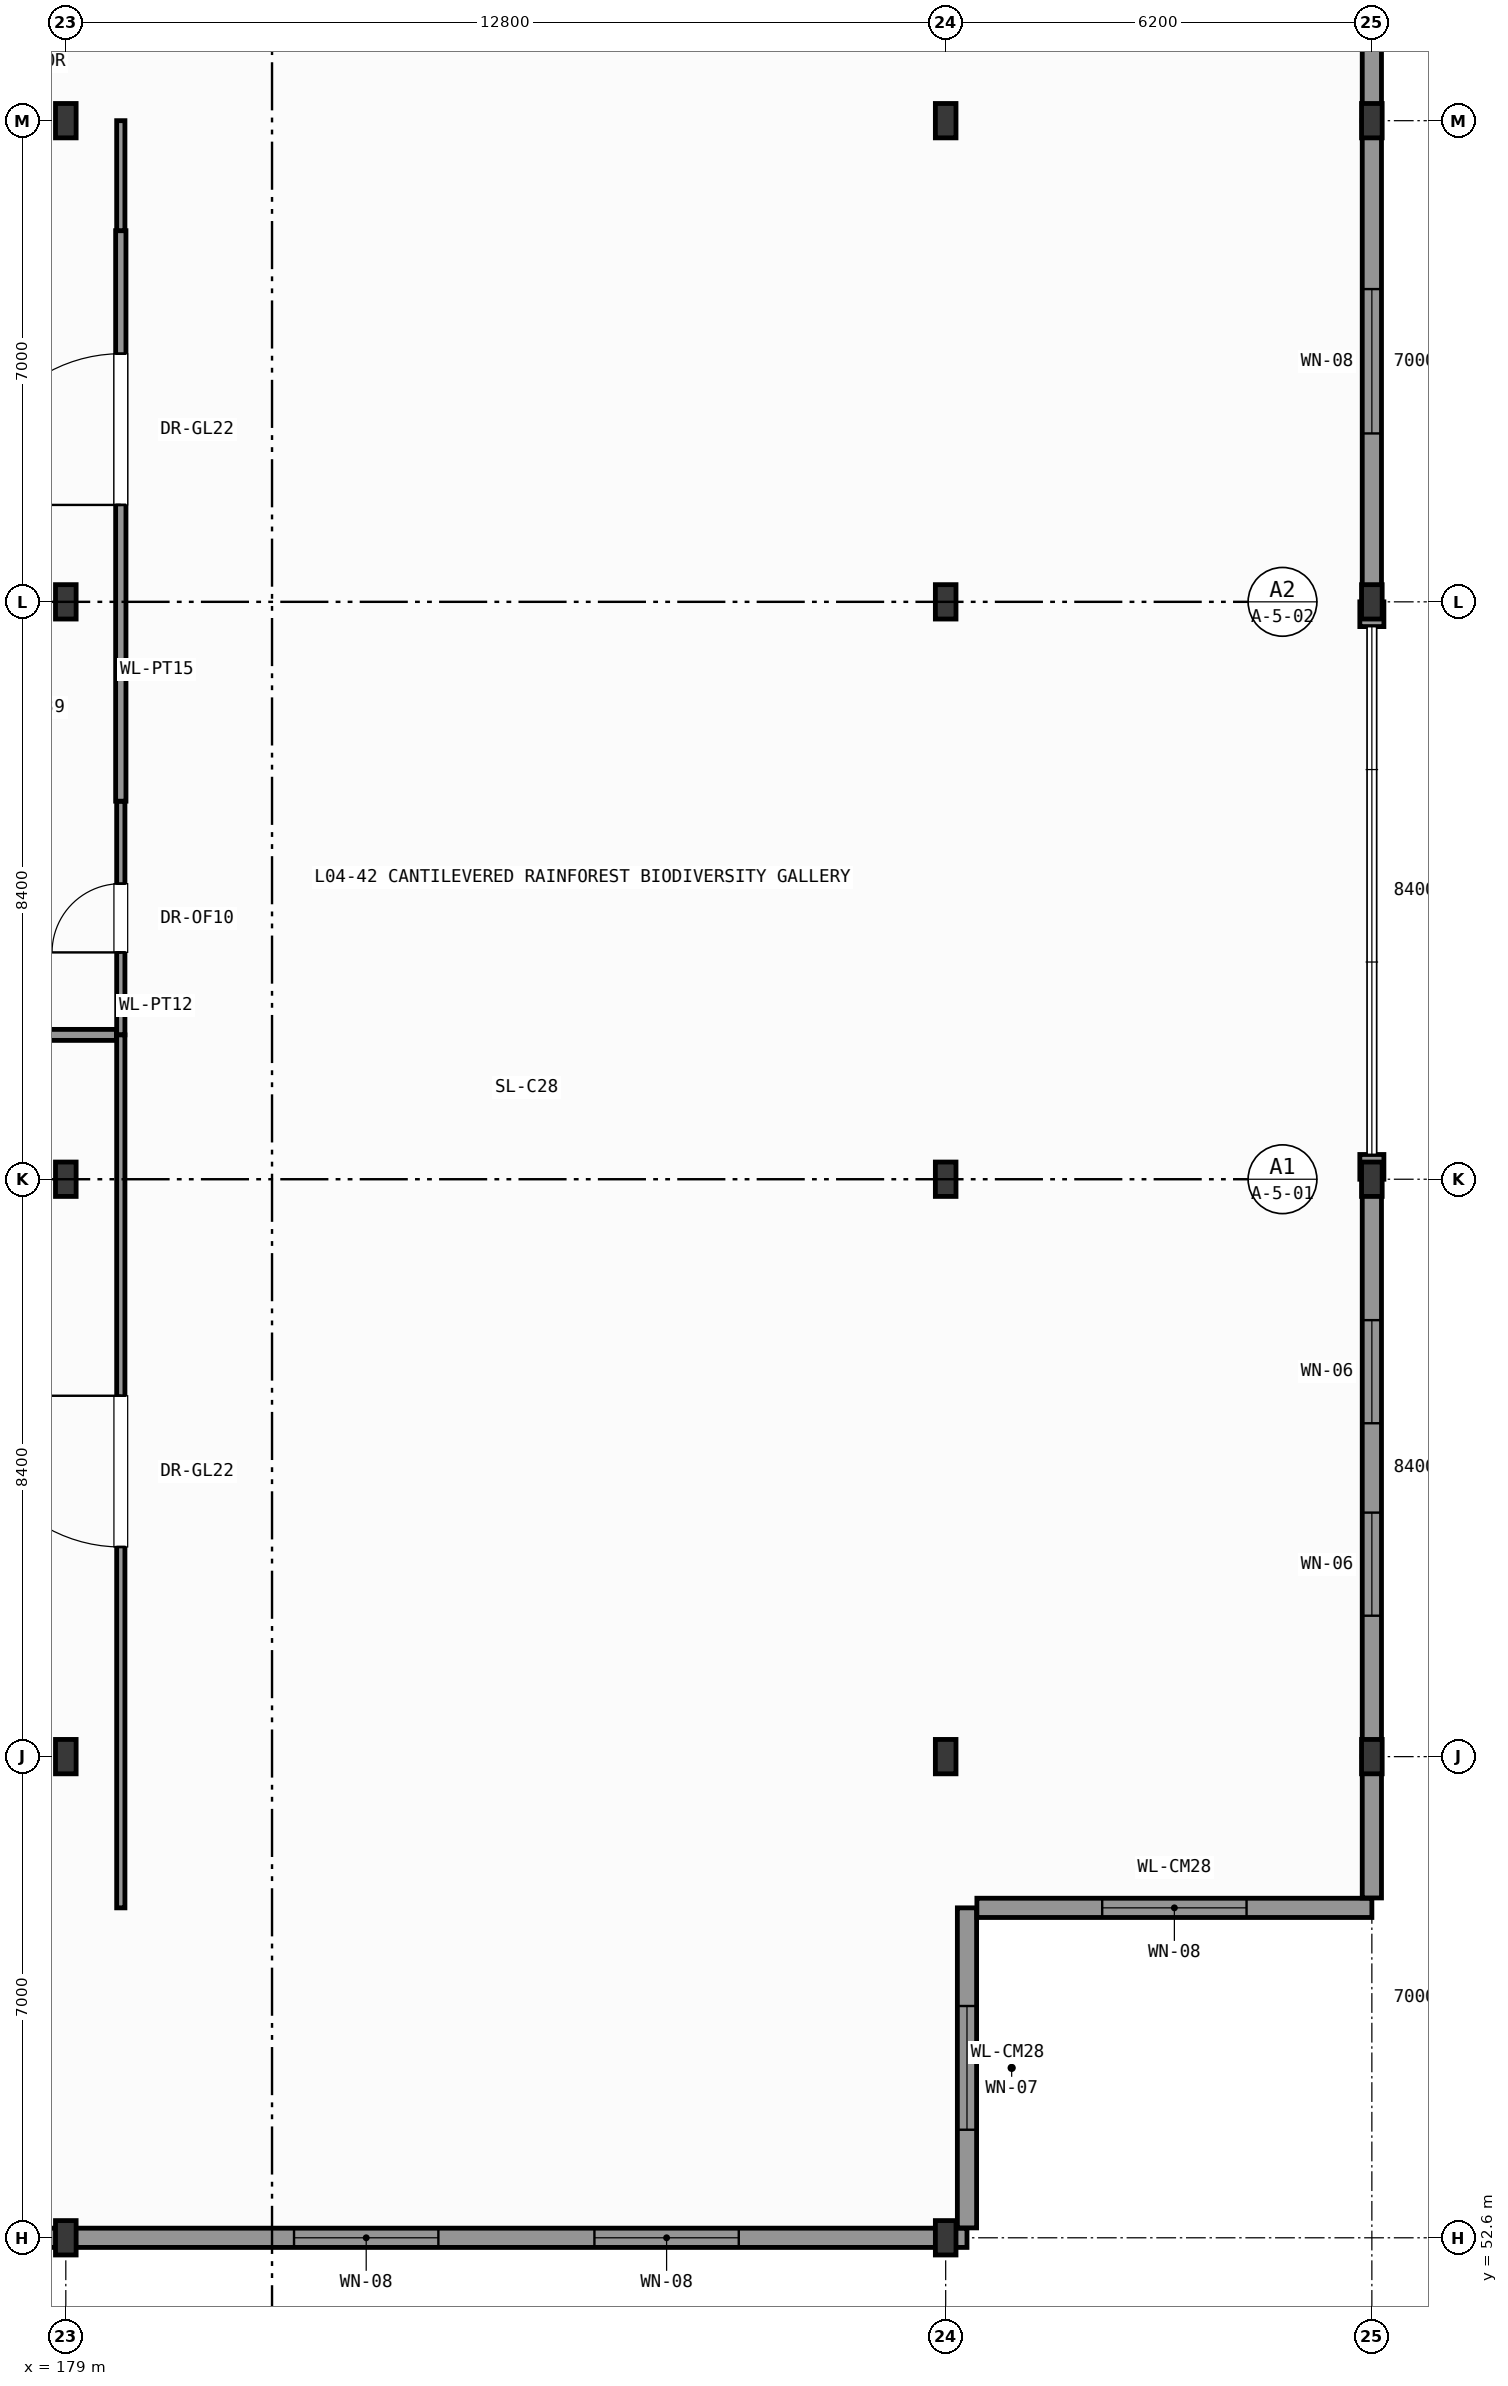
"""IFC4 building model, lengths in metres.
Left out: names, types, materials, properties, quantities, classifications, styles, units other than length and angle.
Written with IfcOpenShell. Run it as: python <this file> out.ifc"""

import sys

from ifc_helpers import new_model, si_unit, direction, frame, frame_2d, origin, origin_2d, place, context, subcontext, project, spatial, rectangle, i_section, extrude, element, fill, save


model = new_model("IFC4")
c1 = context("Model", 3, precision=1e-05, world=origin(), true_north=direction((0.0, 1.0)))
c2 = subcontext(c1, "Body", "Model", "MODEL_VIEW")
j1 = project(units=[si_unit("LENGTHUNIT", "METRE"), si_unit("PLANEANGLEUNIT", "RADIAN")], contexts=[c1])
p1 = place(None, origin())
s1 = spatial("IfcSite", under=j1, at=p1, CompositionType="ELEMENT")
p2 = place(p1, origin())
s2 = spatial("IfcBuilding", under=s1, at=p2, CompositionType="ELEMENT")
p3 = place(p2, frame((0.0, 0.0, 18.0)))
s3 = spatial("IfcBuildingStorey", under=s2, at=p3, CompositionType="ELEMENT", Elevation=18.0)
for number, where, z_axis, x_axis in (
    (1, (179.0, 52.6, 0.0), (0.0, 0.0, 1.0), (1.0, 0.0, 0.0)),
    (2, (179.0, 59.6, 0.0), (0.0, 0.0, 1.0), (1.0, 0.0, 0.0)),
    (3, (179.0, 68.0, 0.0), (0.0, 0.0, 1.0), (1.0, 0.0, 0.0)),
    (4, (179.0, 76.4, 0.0), (0.0, 0.0, 1.0), (1.0, 0.0, 0.0)),
    (5, (179.0, 83.4, 0.0), (0.0, 0.0, 1.0), (1.0, 0.0, 0.0)),
    (6, (191.8, 52.6, 0.0), (0.0, 0.0, 1.0), (1.0, 0.0, 0.0)),
    (7, (191.8, 59.6, 0.0), (0.0, 0.0, 1.0), (1.0, 0.0, 0.0)),
    (8, (191.8, 68.0, 0.0), (0.0, 0.0, 1.0), (1.0, 0.0, 0.0)),
    (9, (191.8, 76.4, 0.0), (0.0, 0.0, 1.0), (1.0, 0.0, 0.0)),
    (10, (191.8, 83.4, 0.0), (0.0, 0.0, 1.0), (1.0, 0.0, 0.0)),
    (11, (198.0, 59.6, 0.0), (0.0, 0.0, 1.0), (1.0, 0.0, 0.0)),
    (12, (198.0, 68.0, 0.0), (0.0, 0.0, 1.0), (1.0, 0.0, 0.0)),
    (13, (198.0, 76.4, 0.0), (0.0, 0.0, 1.0), (1.0, 0.0, 0.0)),
    (14, (198.0, 83.4, 0.0), (0.0, 0.0, 1.0), (1.0, 0.0, 0.0)),
):
    element("IfcColumn", number, at=place(p3, frame(where, z_axis=z_axis, x_axis=x_axis)), inside=s3, PredefinedType="COLUMN", context=c2, shape_type="SweptSolid", body=[
        extrude(i_section(OverallWidth=0.3, OverallDepth=0.5, WebThickness=0.014, FlangeThickness=0.028, FilletRadius=0.027, at=origin_2d()), origin(), (0.0, 0.0, 1.0), 4.2),
    ])
p4 = place(p3, frame((179.0, 52.6, 0.0), z_axis=(0.0, 0.0, 1.0), x_axis=(-1.0, 0.0, 0.0)))
e15 = element("IfcWall", 15, at=p4, inside=s3, PredefinedType="SOLIDWALL", context=c2, shape_type="SweptSolid", body=[
    extrude(rectangle(XDim=11.856, YDim=0.28, at=frame_2d((5.928, 0.0))), origin(), (0.0, 0.0, 1.0), 3.385),
])
p5 = place(p4, frame((3.202, 0.0, 0.95)))
e16 = element("IfcOpeningElement", 16, at=p5, cuts=e15, PredefinedType="OPENING", context=c2, shape_type="SweptSolid", body=[
    extrude(rectangle(XDim=1.5, YDim=2.04, at=frame_2d((0.75, 1.02))), frame((0.0, 0.15, 0.0), z_axis=(0.0, -1.0, 0.0), x_axis=(1.0, 0.0, 0.0)), (0.0, 0.0, 1.0), 0.3),
])
p6 = place(p4, frame((7.154, 0.0, 0.95)))
e17 = element("IfcOpeningElement", 17, at=p6, cuts=e15, PredefinedType="OPENING", context=c2, shape_type="SweptSolid", body=[
    extrude(rectangle(XDim=1.5, YDim=2.04, at=frame_2d((0.75, 1.02))), frame((0.0, 0.15, 0.0), z_axis=(0.0, -1.0, 0.0), x_axis=(1.0, 0.0, 0.0)), (0.0, 0.0, 1.0), 0.3),
])
p7 = place(p3, frame((192.11, 52.6, 0.0), z_axis=(0.0, 0.0, 1.0), x_axis=(-1.0, 0.0, 0.0)))
e18 = element("IfcWall", 18, at=p7, inside=s3, PredefinedType="SOLIDWALL", context=c2, shape_type="SweptSolid", body=[
    extrude(rectangle(XDim=13.11, YDim=0.28, at=frame_2d((6.555, 0.0))), origin(), (0.0, 0.0, 1.0), 3.385),
])
p8 = place(p7, frame((3.32, 0.0, 0.95)))
e19 = element("IfcOpeningElement", 19, at=p8, cuts=e18, PredefinedType="OPENING", context=c2, shape_type="SweptSolid", body=[
    extrude(rectangle(XDim=2.1, YDim=2.04, at=frame_2d((1.05, 1.02))), frame((0.0, 0.15, 0.0), z_axis=(0.0, -1.0, 0.0), x_axis=(1.0, 0.0, 0.0)), (0.0, 0.0, 1.0), 0.3),
])
p9 = place(p7, frame((7.69, 0.0, 0.95)))
e20 = element("IfcOpeningElement", 20, at=p9, cuts=e18, PredefinedType="OPENING", context=c2, shape_type="SweptSolid", body=[
    extrude(rectangle(XDim=2.1, YDim=2.04, at=frame_2d((1.05, 1.02))), frame((0.0, 0.15, 0.0), z_axis=(0.0, -1.0, 0.0), x_axis=(1.0, 0.0, 0.0)), (0.0, 0.0, 1.0), 0.3),
])
p10 = place(p3, frame((192.11, 57.4, 0.0), z_axis=(0.0, 0.0, 1.0), x_axis=(0.0, -1.0, 0.0)))
e21 = element("IfcWall", 21, at=p10, inside=s3, PredefinedType="SOLIDWALL", context=c2, shape_type="SweptSolid", body=[
    extrude(rectangle(XDim=4.656, YDim=0.28, at=frame_2d((2.328, 0.0))), origin(), (0.0, 0.0, 1.0), 3.645),
])
p11 = place(p10, frame((1.428, 0.0, 0.95)))
e22 = element("IfcOpeningElement", 22, at=p11, cuts=e21, PredefinedType="OPENING", context=c2, shape_type="SweptSolid", body=[
    extrude(rectangle(XDim=1.8, YDim=2.29, at=frame_2d((0.9, 1.145))), frame((0.0, 0.15, 0.0), z_axis=(0.0, -1.0, 0.0), x_axis=(1.0, 0.0, 0.0)), (0.0, 0.0, 1.0), 0.3),
])
p12 = place(p3, frame((198.0, 57.4, 0.0), z_axis=(0.0, 0.0, 1.0), x_axis=(-1.0, 0.0, 0.0)))
e23 = element("IfcWall", 23, at=p12, inside=s3, PredefinedType="SOLIDWALL", context=c2, shape_type="SweptSolid", body=[
    extrude(rectangle(XDim=5.746, YDim=0.28, at=frame_2d((2.873, 0.0))), origin(), (0.0, 0.0, 1.0), 3.98),
])
p13 = place(p12, frame((1.823, 0.0, 0.95)))
e24 = element("IfcOpeningElement", 24, at=p13, cuts=e23, PredefinedType="OPENING", context=c2, shape_type="SweptSolid", body=[
    extrude(rectangle(XDim=2.1, YDim=2.63, at=frame_2d((1.05, 1.315))), frame((0.0, 0.15, 0.0), z_axis=(0.0, -1.0, 0.0), x_axis=(1.0, 0.0, 0.0)), (0.0, 0.0, 1.0), 0.3),
])
p14 = place(p3, frame((198.0, 59.6, 0.0), z_axis=(0.0, 0.0, 1.0), x_axis=(0.0, -1.0, 0.0)))
e25 = element("IfcWall", 25, at=p14, inside=s3, PredefinedType="SOLIDWALL", context=c2, shape_type="SweptSolid", body=[
    extrude(rectangle(XDim=2.056, YDim=0.28, at=frame_2d((1.028, 0.0))), origin(), (0.0, 0.0, 1.0), 3.98),
])
p15 = place(p3, frame((198.0, 68.0, 0.0), z_axis=(0.0, 0.0, 1.0), x_axis=(0.0, -1.0, 0.0)))
e26 = element("IfcWall", 26, at=p15, inside=s3, PredefinedType="SOLIDWALL", context=c2, shape_type="SweptSolid", body=[
    extrude(rectangle(XDim=8.4, YDim=0.28, at=frame_2d((4.2, 0.0))), origin(), (0.0, 0.0, 1.0), 3.495),
])
p16 = place(p15, frame((2.05, 0.0, 0.95)))
e27 = element("IfcOpeningElement", 27, at=p16, cuts=e26, PredefinedType="OPENING", context=c2, shape_type="SweptSolid", body=[
    extrude(rectangle(XDim=1.5, YDim=2.15, at=frame_2d((0.75, 1.075))), frame((0.0, 0.15, 0.0), z_axis=(0.0, -1.0, 0.0), x_axis=(1.0, 0.0, 0.0)), (0.0, 0.0, 1.0), 0.3),
])
p17 = place(p15, frame((4.85, 0.0, 0.95)))
e28 = element("IfcOpeningElement", 28, at=p17, cuts=e26, PredefinedType="OPENING", context=c2, shape_type="SweptSolid", body=[
    extrude(rectangle(XDim=1.5, YDim=2.15, at=frame_2d((0.75, 1.075))), frame((0.0, 0.15, 0.0), z_axis=(0.0, -1.0, 0.0), x_axis=(1.0, 0.0, 0.0)), (0.0, 0.0, 1.0), 0.3),
])
p18 = place(p3, frame((198.0, 68.0, 0.0), z_axis=(0.0, 0.0, 1.0), x_axis=(0.0, 1.0, 0.0)))
e29 = element("IfcWall", 29, at=p18, inside=s3, PredefinedType="SOLIDWALL", context=c2, shape_type="SweptSolid", body=[
    extrude(rectangle(XDim=0.36, YDim=0.35, at=frame_2d((0.18, 0.0))), origin(), (0.0, 0.0, 1.0), 3.495),
])
p19 = place(p3, frame((198.0, 76.04, 0.0), z_axis=(0.0, 0.0, 1.0), x_axis=(0.0, 1.0, 0.0)))
e30 = element("IfcWall", 30, at=p19, inside=s3, PredefinedType="SOLIDWALL", context=c2, shape_type="SweptSolid", body=[
    extrude(rectangle(XDim=0.36, YDim=0.35, at=frame_2d((0.18, 0.0))), origin(), (0.0, 0.0, 1.0), 3.495),
])
p20 = place(p3, frame((198.0, 83.4, 0.0), z_axis=(0.0, 0.0, 1.0), x_axis=(0.0, -1.0, 0.0)))
e31 = element("IfcWall", 31, at=p20, inside=s3, PredefinedType="SOLIDWALL", context=c2, shape_type="SweptSolid", body=[
    extrude(rectangle(XDim=7.0, YDim=0.28, at=frame_2d((3.5, 0.0))), origin(), (0.0, 0.0, 1.0), 3.645),
])
p21 = place(p20, frame((2.45, 0.0, 0.95)))
e32 = element("IfcOpeningElement", 32, at=p21, cuts=e31, PredefinedType="OPENING", context=c2, shape_type="SweptSolid", body=[
    extrude(rectangle(XDim=2.1, YDim=2.29, at=frame_2d((1.05, 1.145))), frame((0.0, 0.15, 0.0), z_axis=(0.0, -1.0, 0.0), x_axis=(1.0, 0.0, 0.0)), (0.0, 0.0, 1.0), 0.3),
])
p22 = place(p3, frame((198.0, 90.4, 0.0), z_axis=(0.0, 0.0, 1.0), x_axis=(0.0, -1.0, 0.0)))
e33 = element("IfcWall", 33, at=p22, inside=s3, PredefinedType="SOLIDWALL", context=c2, shape_type="SweptSolid", body=[
    extrude(rectangle(XDim=7.0, YDim=0.28, at=frame_2d((3.5, 0.0))), origin(), (0.0, 0.0, 1.0), 3.645),
])
p23 = place(p22, frame((1.583, 0.0, 0.95)))
e34 = element("IfcOpeningElement", 34, at=p23, cuts=e33, PredefinedType="OPENING", context=c2, shape_type="SweptSolid", body=[
    extrude(rectangle(XDim=1.5, YDim=2.29, at=frame_2d((0.75, 1.145))), frame((0.0, 0.15, 0.0), z_axis=(0.0, -1.0, 0.0), x_axis=(1.0, 0.0, 0.0)), (0.0, 0.0, 1.0), 0.3),
])
p24 = place(p22, frame((3.917, 0.0, 0.95)))
e35 = element("IfcOpeningElement", 35, at=p24, cuts=e33, PredefinedType="OPENING", context=c2, shape_type="SweptSolid", body=[
    extrude(rectangle(XDim=1.5, YDim=2.29, at=frame_2d((0.75, 1.145))), frame((0.0, 0.15, 0.0), z_axis=(0.0, -1.0, 0.0), x_axis=(1.0, 0.0, 0.0)), (0.0, 0.0, 1.0), 0.3),
])
p25 = place(p3, frame((179.8, 70.1, 0.0), z_axis=(0.0, 0.0, 1.0), x_axis=(0.0, 1.0, 0.0)))
e36 = element("IfcWall", 36, at=p25, inside=s3, PredefinedType="PARTITIONING", context=c2, shape_type="SweptSolid", body=[
    extrude(rectangle(XDim=3.4, YDim=0.12, at=frame_2d((1.7, 0.0))), origin(), (0.0, 0.0, 1.0), 3.98),
])
p26 = place(p25, frame((1.2, 0.0, 0.0)))
e37 = element("IfcOpeningElement", 37, at=p26, cuts=e36, PredefinedType="OPENING", context=c2, shape_type="SweptSolid", body=[
    extrude(rectangle(XDim=1.0, YDim=2.15, at=frame_2d((0.5, 1.075))), frame((0.0, 0.07, 0.0), z_axis=(0.0, -1.0, 0.0), x_axis=(1.0, 0.0, 0.0)), (0.0, 0.0, 1.0), 0.14),
])
p27 = place(p3, frame((170.479, 70.1, 0.0), z_axis=(0.0, 0.0, 1.0), x_axis=(1.0, 0.0, 0.0)))
e38 = element("IfcWall", 38, at=p27, inside=s3, PredefinedType="PARTITIONING", context=c2, shape_type="SweptSolid", body=[
    extrude(rectangle(XDim=9.257, YDim=0.16, at=frame_2d((4.628, 0.0))), origin(), (0.0, 0.0, 1.0), 3.98),
])
p28 = place(p27, frame((3.529, 0.0, 0.0)))
e39 = element("IfcOpeningElement", 39, at=p28, cuts=e38, PredefinedType="OPENING", context=c2, shape_type="SweptSolid", body=[
    extrude(rectangle(XDim=2.2, YDim=2.6, at=frame_2d((1.1, 1.3))), frame((0.0, 0.09, 0.0), z_axis=(0.0, -1.0, 0.0), x_axis=(1.0, 0.0, 0.0)), (0.0, 0.0, 1.0), 0.18),
])
p29 = place(p3, frame((179.8, 73.5, 0.0), z_axis=(0.0, 0.0, 1.0), x_axis=(0.0, 1.0, 0.0)))
e40 = element("IfcWall", 40, at=p29, inside=s3, PredefinedType="PARTITIONING", context=c2, shape_type="SweptSolid", body=[
    extrude(rectangle(XDim=8.3, YDim=0.15, at=frame_2d((4.15, 0.0))), origin(), (0.0, 0.0, 1.0), 3.98),
])
p30 = place(p29, frame((4.31, 0.0, 0.0)))
e41 = element("IfcOpeningElement", 41, at=p30, cuts=e40, PredefinedType="OPENING", context=c2, shape_type="SweptSolid", body=[
    extrude(rectangle(XDim=2.2, YDim=2.6, at=frame_2d((1.1, 1.3))), frame((0.0, 0.085, 0.0), z_axis=(0.0, -1.0, 0.0), x_axis=(1.0, 0.0, 0.0)), (0.0, 0.0, 1.0), 0.17),
])
p31 = place(p3, frame((179.8, 81.8, 0.0), z_axis=(0.0, 0.0, 1.0), x_axis=(0.0, 1.0, 0.0)))
e42 = element("IfcWall", 42, at=p31, inside=s3, PredefinedType="PARTITIONING", context=c2, shape_type="SweptSolid", body=[
    extrude(rectangle(XDim=1.6, YDim=0.12, at=frame_2d((0.8, 0.0))), origin(), (0.0, 0.0, 1.0), 3.98),
])
p32 = place(p3, frame((179.8, 57.4, 0.0), z_axis=(0.0, 0.0, 1.0), x_axis=(0.0, 1.0, 0.0)))
e43 = element("IfcWall", 43, at=p32, inside=s3, PredefinedType="PARTITIONING", context=c2, shape_type="SweptSolid", body=[
    extrude(rectangle(XDim=12.7, YDim=0.12, at=frame_2d((6.35, 0.0))), origin(), (0.0, 0.0, 1.0), 3.98),
])
p33 = place(p32, frame((5.25, 0.0, 0.0)))
e44 = element("IfcOpeningElement", 44, at=p33, cuts=e43, PredefinedType="OPENING", context=c2, shape_type="SweptSolid", body=[
    extrude(rectangle(XDim=2.2, YDim=2.6, at=frame_2d((1.1, 1.3))), frame((0.0, 0.07, 0.0), z_axis=(0.0, -1.0, 0.0), x_axis=(1.0, 0.0, 0.0)), (0.0, 0.0, 1.0), 0.14),
])
p34 = place(p8, origin())
e45 = element("IfcWindow", 45, at=p34, inside=s3, PartitioningType="SINGLE_PANEL", PredefinedType="WINDOW", context=c2, shape_type="SweptSolid", body=[
    extrude(rectangle(XDim=2.1, YDim=2.04, at=frame_2d((1.05, 1.02))), frame((0.0, 0.03, 0.0), z_axis=(0.0, -1.0, 0.0), x_axis=(1.0, 0.0, 0.0)), (0.0, 0.0, 1.0), 0.06),
])
fill(e19, e45)
p35 = place(p9, origin())
e46 = element("IfcWindow", 46, at=p35, inside=s3, PartitioningType="SINGLE_PANEL", PredefinedType="WINDOW", context=c2, shape_type="SweptSolid", body=[
    extrude(rectangle(XDim=2.1, YDim=2.04, at=frame_2d((1.05, 1.02))), frame((0.0, 0.03, 0.0), z_axis=(0.0, -1.0, 0.0), x_axis=(1.0, 0.0, 0.0)), (0.0, 0.0, 1.0), 0.06),
])
fill(e20, e46)
p36 = place(p11, origin())
e47 = element("IfcWindow", 47, at=p36, inside=s3, PartitioningType="SINGLE_PANEL", PredefinedType="WINDOW", context=c2, shape_type="SweptSolid", body=[
    extrude(rectangle(XDim=1.8, YDim=2.29, at=frame_2d((0.9, 1.145))), frame((0.0, 0.03, 0.0), z_axis=(0.0, -1.0, 0.0), x_axis=(1.0, 0.0, 0.0)), (0.0, 0.0, 1.0), 0.06),
])
fill(e22, e47)
p37 = place(p13, origin())
e48 = element("IfcWindow", 48, at=p37, inside=s3, PartitioningType="SINGLE_PANEL", PredefinedType="WINDOW", context=c2, shape_type="SweptSolid", body=[
    extrude(rectangle(XDim=2.1, YDim=2.63, at=frame_2d((1.05, 1.315))), frame((0.0, 0.03, 0.0), z_axis=(0.0, -1.0, 0.0), x_axis=(1.0, 0.0, 0.0)), (0.0, 0.0, 1.0), 0.06),
])
fill(e24, e48)
p38 = place(p16, origin())
e49 = element("IfcWindow", 49, at=p38, inside=s3, PartitioningType="SINGLE_PANEL", PredefinedType="WINDOW", context=c2, shape_type="SweptSolid", body=[
    extrude(rectangle(XDim=1.5, YDim=2.15, at=frame_2d((0.75, 1.075))), frame((0.0, 0.03, 0.0), z_axis=(0.0, -1.0, 0.0), x_axis=(1.0, 0.0, 0.0)), (0.0, 0.0, 1.0), 0.06),
])
fill(e27, e49)
p39 = place(p17, origin())
e50 = element("IfcWindow", 50, at=p39, inside=s3, PartitioningType="SINGLE_PANEL", PredefinedType="WINDOW", context=c2, shape_type="SweptSolid", body=[
    extrude(rectangle(XDim=1.5, YDim=2.15, at=frame_2d((0.75, 1.075))), frame((0.0, 0.03, 0.0), z_axis=(0.0, -1.0, 0.0), x_axis=(1.0, 0.0, 0.0)), (0.0, 0.0, 1.0), 0.06),
])
fill(e28, e50)
p40 = place(p21, origin())
e51 = element("IfcWindow", 51, at=p40, inside=s3, PartitioningType="SINGLE_PANEL", PredefinedType="WINDOW", context=c2, shape_type="SweptSolid", body=[
    extrude(rectangle(XDim=2.1, YDim=2.29, at=frame_2d((1.05, 1.145))), frame((0.0, 0.03, 0.0), z_axis=(0.0, -1.0, 0.0), x_axis=(1.0, 0.0, 0.0)), (0.0, 0.0, 1.0), 0.06),
])
fill(e32, e51)
p41 = place(p26, origin())
e52 = element("IfcDoor", 52, at=p41, inside=s3, OperationType="SINGLE_SWING_LEFT", PredefinedType="DOOR", context=c2, shape_type="SweptSolid", body=[
    extrude(rectangle(XDim=1.0, YDim=2.15, at=frame_2d((0.5, 1.075))), frame((0.0, 0.025, 0.0), z_axis=(0.0, -1.0, 0.0), x_axis=(1.0, 0.0, 0.0)), (0.0, 0.0, 1.0), 0.05),
])
fill(e37, e52)
p42 = place(p30, origin())
e53 = element("IfcDoor", 53, at=p42, inside=s3, OperationType="SINGLE_SWING_LEFT", PredefinedType="DOOR", context=c2, shape_type="SweptSolid", body=[
    extrude(rectangle(XDim=2.2, YDim=2.6, at=frame_2d((1.1, 1.3))), frame((0.0, 0.025, 0.0), z_axis=(0.0, -1.0, 0.0), x_axis=(1.0, 0.0, 0.0)), (0.0, 0.0, 1.0), 0.05),
])
fill(e41, e53)
p43 = place(p33, origin())
e54 = element("IfcDoor", 54, at=p43, inside=s3, OperationType="SINGLE_SWING_RIGHT", PredefinedType="DOOR", context=c2, shape_type="SweptSolid", body=[
    extrude(rectangle(XDim=2.2, YDim=2.6, at=frame_2d((1.1, 1.3))), frame((0.0, 0.025, 0.0), z_axis=(0.0, -1.0, 0.0), x_axis=(1.0, 0.0, 0.0)), (0.0, 0.0, 1.0), 0.05),
])
fill(e44, e54)
save(model, sys.argv[1])
